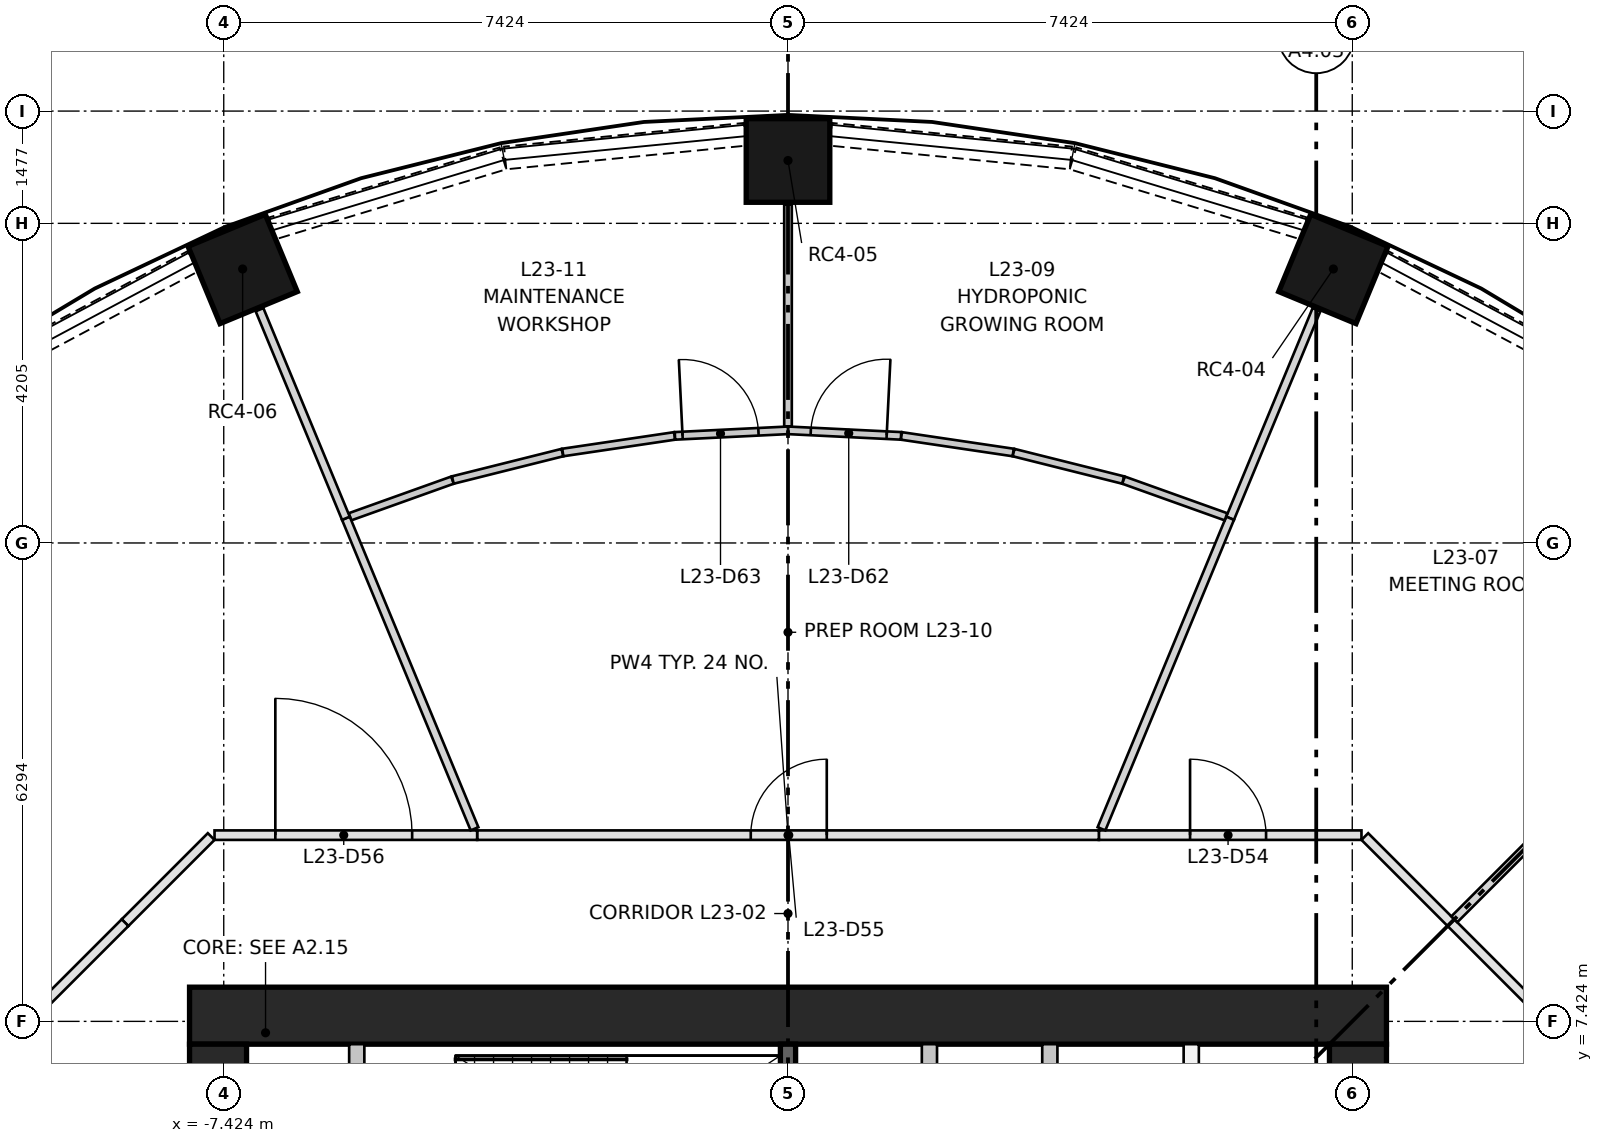
"""IFC4 building model, lengths in metres.
Left out: names, types, materials, properties, quantities, classifications, styles, units other than length and angle.
Written with IfcOpenShell. Run it as: python <this file> out.ifc"""

import sys

from ifc_helpers import new_model, si_unit, direction, frame, frame_2d, origin, origin_2d, place, context, subcontext, project, spatial, rectangle, extrude, element, fill, save


model = new_model("IFC4")
c1 = context("Model", 3, precision=1e-05, world=origin(), true_north=direction((0.0, 1.0)))
c2 = subcontext(c1, "Body", "Model", "MODEL_VIEW")
j1 = project(units=[si_unit("LENGTHUNIT", "METRE"), si_unit("PLANEANGLEUNIT", "RADIAN")], contexts=[c1])
p1 = place(None, origin())
s1 = spatial("IfcSite", under=j1, at=p1, CompositionType="ELEMENT")
p2 = place(p1, origin())
s2 = spatial("IfcBuilding", under=s1, at=p2, CompositionType="ELEMENT")
p3 = place(p2, frame((0.0, 0.0, 91.0)))
s3 = spatial("IfcBuildingStorey", under=s2, at=p3, CompositionType="ELEMENT", Elevation=91.0)
for number, where, z_axis, x_axis in (
    (1, (7.175, 17.323, 0.0), (0.0, 0.0, 1.0), (0.383, 0.924, 0.0)),
    (2, (0.0, 18.75, 0.0), (0.0, 0.0, 1.0), (0.0, 1.0, 0.0)),
    (3, (-7.175, 17.323, 0.0), (0.0, 0.0, 1.0), (-0.383, 0.924, 0.0)),
):
    element("IfcColumn", number, at=place(p3, frame(where, z_axis=z_axis, x_axis=x_axis)), inside=s3, PredefinedType="COLUMN", context=c2, shape_type="SweptSolid", body=[
        extrude(rectangle(XDim=1.1, YDim=1.1, at=origin_2d()), origin(), (0.0, 0.0, 1.0), 3.65),
    ])
p4 = place(p3, frame((-7.874, 7.499, 0.0), z_axis=(0.0, 0.0, 1.0), x_axis=(1.0, 0.0, 0.0)))
e4 = element("IfcWall", 4, at=p4, inside=s3, PredefinedType="SHEAR", context=c2, shape_type="SweptSolid", body=[
    extrude(rectangle(XDim=15.748, YDim=0.75, at=frame_2d((7.874, 0.0))), origin(), (0.0, 0.0, 1.0), 3.65),
])
p5 = place(p3, frame((-7.499, -7.124, 0.0), z_axis=(0.0, 0.0, 1.0), x_axis=(0.0, 1.0, 0.0)))
e5 = element("IfcWall", 5, at=p5, inside=s3, PredefinedType="SHEAR", context=c2, shape_type="SweptSolid", body=[
    extrude(rectangle(XDim=14.248, YDim=0.75, at=frame_2d((7.124, 0.0))), origin(), (0.0, 0.0, 1.0), 3.65),
])
p6 = place(p5, frame((6.624, 0.0, 0.0)))
e6 = element("IfcOpeningElement", 6, at=p6, cuts=e5, PredefinedType="OPENING", context=c2, shape_type="SweptSolid", body=[
    extrude(rectangle(XDim=1.0, YDim=2.1, at=frame_2d((0.5, 1.05))), frame((0.0, 0.385, 0.0), z_axis=(0.0, -1.0, 0.0), x_axis=(1.0, 0.0, 0.0)), (0.0, 0.0, 1.0), 0.77),
])
p7 = place(p5, frame((3.5, 0.0, 0.0)))
e7 = element("IfcOpeningElement", 7, at=p7, cuts=e5, PredefinedType="OPENING", context=c2, shape_type="SweptSolid", body=[
    extrude(rectangle(XDim=1.8, YDim=2.1, at=frame_2d((0.9, 1.05))), frame((0.0, 0.385, 0.0), z_axis=(0.0, -1.0, 0.0), x_axis=(1.0, 0.0, 0.0)), (0.0, 0.0, 1.0), 0.77),
])
p8 = place(p5, frame((8.948, 0.0, 0.0)))
e8 = element("IfcOpeningElement", 8, at=p8, cuts=e5, PredefinedType="OPENING", context=c2, shape_type="SweptSolid", body=[
    extrude(rectangle(XDim=1.8, YDim=2.1, at=frame_2d((0.9, 1.05))), frame((0.0, 0.385, 0.0), z_axis=(0.0, -1.0, 0.0), x_axis=(1.0, 0.0, 0.0)), (0.0, 0.0, 1.0), 0.77),
])
p9 = place(p5, frame((12.124, 0.0, 0.0)))
e9 = element("IfcOpeningElement", 9, at=p9, cuts=e5, PredefinedType="OPENING", context=c2, shape_type="SweptSolid", body=[
    extrude(rectangle(XDim=1.0, YDim=2.1, at=frame_2d((0.5, 1.05))), frame((0.0, 0.385, 0.0), z_axis=(0.0, -1.0, 0.0), x_axis=(1.0, 0.0, 0.0)), (0.0, 0.0, 1.0), 0.77),
])
p10 = place(p3, frame((7.499, -7.124, 0.0), z_axis=(0.0, 0.0, 1.0), x_axis=(0.0, 1.0, 0.0)))
e10 = element("IfcWall", 10, at=p10, inside=s3, PredefinedType="SHEAR", context=c2, shape_type="SweptSolid", body=[
    extrude(rectangle(XDim=14.248, YDim=0.75, at=frame_2d((7.124, 0.0))), origin(), (0.0, 0.0, 1.0), 3.65),
])
p11 = place(p10, frame((6.624, 0.0, 0.0)))
e11 = element("IfcOpeningElement", 11, at=p11, cuts=e10, PredefinedType="OPENING", context=c2, shape_type="SweptSolid", body=[
    extrude(rectangle(XDim=1.0, YDim=2.1, at=frame_2d((0.5, 1.05))), frame((0.0, 0.385, 0.0), z_axis=(0.0, -1.0, 0.0), x_axis=(1.0, 0.0, 0.0)), (0.0, 0.0, 1.0), 0.77),
])
p12 = place(p10, frame((3.5, 0.0, 0.0)))
e12 = element("IfcOpeningElement", 12, at=p12, cuts=e10, PredefinedType="OPENING", context=c2, shape_type="SweptSolid", body=[
    extrude(rectangle(XDim=1.8, YDim=2.1, at=frame_2d((0.9, 1.05))), frame((0.0, 0.385, 0.0), z_axis=(0.0, -1.0, 0.0), x_axis=(1.0, 0.0, 0.0)), (0.0, 0.0, 1.0), 0.77),
])
p13 = place(p10, frame((8.948, 0.0, 0.0)))
e13 = element("IfcOpeningElement", 13, at=p13, cuts=e10, PredefinedType="OPENING", context=c2, shape_type="SweptSolid", body=[
    extrude(rectangle(XDim=1.8, YDim=2.1, at=frame_2d((0.9, 1.05))), frame((0.0, 0.385, 0.0), z_axis=(0.0, -1.0, 0.0), x_axis=(1.0, 0.0, 0.0)), (0.0, 0.0, 1.0), 0.77),
])
p14 = place(p3, frame((0.0, 5.574, 0.0), z_axis=(0.0, 0.0, 1.0), x_axis=(0.0, 1.0, 0.0)))
e14 = element("IfcWall", 14, at=p14, inside=s3, PredefinedType="SHEAR", context=c2, shape_type="SweptSolid", body=[
    extrude(rectangle(XDim=1.55, YDim=0.2, at=frame_2d((0.775, 0.0))), origin(), (0.0, 0.0, 1.0), 3.3),
])
for number, where, z_axis, x_axis in (
    (15, (1.861, 4.174, 0.0), (0.0, 0.0, 1.0), (0.0, 1.0, 0.0)),
    (16, (3.445, 4.174, 0.0), (0.0, 0.0, 1.0), (0.0, 1.0, 0.0)),
    (17, (5.305, 4.174, 0.0), (0.0, 0.0, 1.0), (0.0, 1.0, 0.0)),
):
    element("IfcWall", number, at=place(p3, frame(where, z_axis=z_axis, x_axis=x_axis)), inside=s3, PredefinedType="PARTITIONING", context=c2, shape_type="SweptSolid", body=[
        extrude(rectangle(XDim=2.95, YDim=0.2, at=frame_2d((1.475, 0.0))), origin(), (0.0, 0.0, 1.0), 3.3),
    ])
p15 = place(p3, frame((-5.674, 4.174, 0.0), z_axis=(0.0, 0.0, 1.0), x_axis=(0.0, 1.0, 0.0)))
e18 = element("IfcWall", 18, at=p15, inside=s3, PredefinedType="PARTITIONING", context=c2, shape_type="SweptSolid", body=[
    extrude(rectangle(XDim=2.95, YDim=0.2, at=frame_2d((1.475, 0.0))), origin(), (0.0, 0.0, 1.0), 3.3),
])
p16 = place(p15, frame((0.125, 0.0, 0.0)))
e19 = element("IfcOpeningElement", 19, at=p16, cuts=e18, PredefinedType="OPENING", context=c2, shape_type="SweptSolid", body=[
    extrude(rectangle(XDim=0.95, YDim=2.1, at=frame_2d((0.475, 1.05))), frame((0.0, 0.11, 0.0), z_axis=(0.0, -1.0, 0.0), x_axis=(1.0, 0.0, 0.0)), (0.0, 0.0, 1.0), 0.22),
])
p17 = place(p15, frame((1.725, 0.0, 0.0)))
e20 = element("IfcOpeningElement", 20, at=p17, cuts=e18, PredefinedType="OPENING", context=c2, shape_type="SweptSolid", body=[
    extrude(rectangle(XDim=0.95, YDim=2.1, at=frame_2d((0.475, 1.05))), frame((0.0, 0.11, 0.0), z_axis=(0.0, -1.0, 0.0), x_axis=(1.0, 0.0, 0.0)), (0.0, 0.0, 1.0), 0.22),
])
p18 = place(p3, frame((10.626, 15.929, 0.0), z_axis=(0.0, 0.0, 1.0), x_axis=(-0.88188808669, 0.471458802606, 0.0)))
e21 = element("IfcWall", 21, at=p18, inside=s3, PredefinedType="SOLIDWALL", context=c2, shape_type="SweptSolid", body=[
    extrude(rectangle(XDim=3.172, YDim=0.3, at=frame_2d((1.586, 0.0))), origin(), (0.0, 0.0, 1.0), 0.9),
])
p19 = place(p3, frame((6.787, 17.856, 0.0), z_axis=(0.0, 0.0, 1.0), x_axis=(-0.956927923582, 0.290325591482, 0.0)))
e22 = element("IfcWall", 22, at=p19, inside=s3, PredefinedType="SOLIDWALL", context=c2, shape_type="SweptSolid", body=[
    extrude(rectangle(XDim=3.173, YDim=0.3, at=frame_2d((1.586, 0.0))), origin(), (0.0, 0.0, 1.0), 0.9),
])
for number, where, z_axis, x_axis in (
    (23, (3.721, 18.783, 0.0), (0.0, 0.0, 1.0), (-0.995, 0.098, 0.0)),
    (24, (-0.564, 19.094, 0.0), (0.0, 0.0, 1.0), (-0.995, -0.098, 0.0)),
):
    element("IfcWall", number, at=place(p3, frame(where, z_axis=z_axis, x_axis=x_axis)), inside=s3, PredefinedType="SOLIDWALL", context=c2, shape_type="SweptSolid", body=[
        extrude(rectangle(XDim=3.173, YDim=0.3, at=frame_2d((1.586, 0.0))), origin(), (0.0, 0.0, 1.0), 0.9),
    ])
p20 = place(p3, frame((-3.75, 18.778, 0.0), z_axis=(0.0, 0.0, 1.0), x_axis=(-0.956927923582, -0.290325591482, 0.0)))
e25 = element("IfcWall", 25, at=p20, inside=s3, PredefinedType="SOLIDWALL", context=c2, shape_type="SweptSolid", body=[
    extrude(rectangle(XDim=3.173, YDim=0.3, at=frame_2d((1.586, 0.0))), origin(), (0.0, 0.0, 1.0), 0.9),
])
p21 = place(p3, frame((-7.828, 17.425, 0.0), z_axis=(0.0, 0.0, 1.0), x_axis=(-0.88188808669, -0.471458802606, 0.0)))
e26 = element("IfcWall", 26, at=p21, inside=s3, PredefinedType="SOLIDWALL", context=c2, shape_type="SweptSolid", body=[
    extrude(rectangle(XDim=3.172, YDim=0.3, at=frame_2d((1.586, 0.0))), origin(), (0.0, 0.0, 1.0), 0.9),
])
p22 = place(p3, frame((8.722, 8.722, 0.0), z_axis=(0.0, 0.0, 1.0), x_axis=(0.70718294931, -0.707030604857, 0.0)))
e27 = element("IfcWall", 27, at=p22, inside=s3, PredefinedType="PARTITIONING", context=c2, shape_type="SweptSolid", body=[
    extrude(rectangle(XDim=1.603, YDim=0.125, at=frame_2d((0.801, 0.0))), origin(), (0.0, 0.0, 1.0), 3.3),
])
p23 = place(p3, frame((4.09, 9.874, 0.0), z_axis=(0.0, 0.0, 1.0), x_axis=(1.0, 0.0, 0.0)))
e28 = element("IfcWall", 28, at=p23, inside=s3, PredefinedType="PARTITIONING", context=c2, shape_type="SweptSolid", body=[
    extrude(rectangle(XDim=3.455, YDim=0.125, at=frame_2d((1.728, 0.0))), origin(), (0.0, 0.0, 1.0), 3.3),
])
p24 = place(p23, frame((1.2, 0.0, 0.0)))
e29 = element("IfcOpeningElement", 29, at=p24, cuts=e28, PredefinedType="OPENING", context=c2, shape_type="SweptSolid", body=[
    extrude(rectangle(XDim=1.0, YDim=2.1, at=frame_2d((0.5, 1.05))), frame((0.0, 0.073, 0.0), z_axis=(0.0, -1.0, 0.0), x_axis=(1.0, 0.0, 0.0)), (0.0, 0.0, 1.0), 0.145),
])
p25 = place(p3, frame((7.589, 9.856, 0.0), z_axis=(0.0, 0.0, 1.0), x_axis=(0.707030604857, -0.70718294931, 0.0)))
e30 = element("IfcWall", 30, at=p25, inside=s3, PredefinedType="PARTITIONING", context=c2, shape_type="SweptSolid", body=[
    extrude(rectangle(XDim=1.603, YDim=0.125, at=frame_2d((0.801, 0.0))), origin(), (0.0, 0.0, 1.0), 3.3),
])
p26 = place(p3, frame((-4.09, 9.874, 0.0), z_axis=(0.0, 0.0, 1.0), x_axis=(1.0, 0.0, 0.0)))
e31 = element("IfcWall", 31, at=p26, inside=s3, PredefinedType="PARTITIONING", context=c2, shape_type="SweptSolid", body=[
    extrude(rectangle(XDim=8.18, YDim=0.125, at=frame_2d((4.09, 0.0))), origin(), (0.0, 0.0, 1.0), 3.3),
])
p27 = place(p26, frame((3.6, 0.0, 0.0)))
e32 = element("IfcOpeningElement", 32, at=p27, cuts=e31, PredefinedType="OPENING", context=c2, shape_type="SweptSolid", body=[
    extrude(rectangle(XDim=1.0, YDim=2.1, at=frame_2d((0.5, 1.05))), frame((0.0, 0.073, 0.0), z_axis=(0.0, -1.0, 0.0), x_axis=(1.0, 0.0, 0.0)), (0.0, 0.0, 1.0), 0.145),
])
p28 = place(p3, frame((-8.722, 8.722, 0.0), z_axis=(0.0, 0.0, 1.0), x_axis=(0.707030604857, 0.70718294931, 0.0)))
e33 = element("IfcWall", 33, at=p28, inside=s3, PredefinedType="PARTITIONING", context=c2, shape_type="SweptSolid", body=[
    extrude(rectangle(XDim=1.603, YDim=0.125, at=frame_2d((0.801, 0.0))), origin(), (0.0, 0.0, 1.0), 3.3),
])
p29 = place(p3, frame((-7.545, 9.874, 0.0), z_axis=(0.0, 0.0, 1.0), x_axis=(1.0, 0.0, 0.0)))
e34 = element("IfcWall", 34, at=p29, inside=s3, PredefinedType="PARTITIONING", context=c2, shape_type="SweptSolid", body=[
    extrude(rectangle(XDim=3.455, YDim=0.125, at=frame_2d((1.728, 0.0))), origin(), (0.0, 0.0, 1.0), 3.3),
])
p30 = place(p29, frame((0.8, 0.0, 0.0)))
e35 = element("IfcOpeningElement", 35, at=p30, cuts=e34, PredefinedType="OPENING", context=c2, shape_type="SweptSolid", body=[
    extrude(rectangle(XDim=1.8, YDim=2.1, at=frame_2d((0.9, 1.05))), frame((0.0, 0.073, 0.0), z_axis=(0.0, -1.0, 0.0), x_axis=(1.0, 0.0, 0.0)), (0.0, 0.0, 1.0), 0.145),
])
p31 = place(p3, frame((-9.856, 7.589, 0.0), z_axis=(0.0, 0.0, 1.0), x_axis=(0.70718294931, 0.707030604857, 0.0)))
e36 = element("IfcWall", 36, at=p31, inside=s3, PredefinedType="PARTITIONING", context=c2, shape_type="SweptSolid", body=[
    extrude(rectangle(XDim=1.603, YDim=0.125, at=frame_2d((0.801, 0.0))), origin(), (0.0, 0.0, 1.0), 3.3),
])
p32 = place(p3, frame((12.848, 12.848, 0.0), z_axis=(0.0, 0.0, 1.0), x_axis=(-0.707106781187, -0.707106781187, 0.0)))
e37 = element("IfcWall", 37, at=p32, inside=s3, PredefinedType="PARTITIONING", context=c2, shape_type="SweptSolid", body=[
    extrude(rectangle(XDim=5.772, YDim=0.11, at=frame_2d((2.886, 0.0))), origin(), (0.0, 0.0, 1.0), 3.3),
])
p33 = place(p3, frame((5.817, 14.043, 0.0), z_axis=(0.0, 0.0, 1.0), x_axis=(0.382659139036, 0.923889594764, 0.0)))
e38 = element("IfcWall", 38, at=p33, inside=s3, PredefinedType="PARTITIONING", context=c2, shape_type="SweptSolid", body=[
    extrude(rectangle(XDim=2.97, YDim=0.11, at=frame_2d((1.485, 0.0))), origin(), (0.0, 0.0, 1.0), 3.3),
])
p34 = place(p3, frame((4.125, 9.958, 0.0), z_axis=(0.0, 0.0, 1.0), x_axis=(0.382709362011, 0.923868791674, 0.0)))
e39 = element("IfcWall", 39, at=p34, inside=s3, PredefinedType="PARTITIONING", context=c2, shape_type="SweptSolid", body=[
    extrude(rectangle(XDim=4.422, YDim=0.11, at=frame_2d((2.211, 0.0))), origin(), (0.0, 0.0, 1.0), 3.3),
])
p35 = place(p3, frame((0.0, 15.2, 0.0), z_axis=(0.0, 0.0, 1.0), x_axis=(0.998797711146, -0.049021752402, 0.0)))
e40 = element("IfcWall", 40, at=p35, inside=s3, PredefinedType="PARTITIONING", context=c2, shape_type="SweptSolid", body=[
    extrude(rectangle(XDim=1.489, YDim=0.1, at=frame_2d((0.745, 0.0))), origin(), (0.0, 0.0, 1.0), 3.3),
])
p36 = place(p35, frame((0.3, 0.0, 0.0)))
e41 = element("IfcOpeningElement", 41, at=p36, cuts=e40, PredefinedType="OPENING", context=c2, shape_type="SweptSolid", body=[
    extrude(rectangle(XDim=1.0, YDim=2.1, at=frame_2d((0.5, 1.05))), frame((0.0, 0.06, 0.0), z_axis=(0.0, -1.0, 0.0), x_axis=(1.0, 0.0, 0.0)), (0.0, 0.0, 1.0), 0.12),
])
p37 = place(p3, frame((2.963, 14.908, 0.0), z_axis=(0.0, 0.0, 1.0), x_axis=(-0.989166402168, 0.146798599525, 0.0)))
e42 = element("IfcWall", 42, at=p37, inside=s3, PredefinedType="PARTITIONING", context=c2, shape_type="SweptSolid", body=[
    extrude(rectangle(XDim=1.487, YDim=0.1, at=frame_2d((0.743, 0.0))), origin(), (0.0, 0.0, 1.0), 3.3),
])
p38 = place(p3, frame((4.41, 14.546, 0.0), z_axis=(0.0, 0.0, 1.0), x_axis=(-0.970055497102, 0.242883372306, 0.0)))
e43 = element("IfcWall", 43, at=p38, inside=s3, PredefinedType="PARTITIONING", context=c2, shape_type="SweptSolid", body=[
    extrude(rectangle(XDim=1.487, YDim=0.1, at=frame_2d((0.743, 0.0))), origin(), (0.0, 0.0, 1.0), 3.3),
])
p39 = place(p3, frame((5.763, 14.062, 0.0), z_axis=(0.0, 0.0, 1.0), x_axis=(-0.941587499657, 0.33676843749, 0.0)))
e44 = element("IfcWall", 44, at=p39, inside=s3, PredefinedType="PARTITIONING", context=c2, shape_type="SweptSolid", body=[
    extrude(rectangle(XDim=1.432, YDim=0.1, at=frame_2d((0.716, 0.0))), origin(), (0.0, 0.0, 1.0), 3.3),
])
p40 = place(p3, frame((0.0, 15.252, 0.0), z_axis=(0.0, 0.0, 1.0), x_axis=(0.0, 1.0, 0.0)))
e45 = element("IfcWall", 45, at=p40, inside=s3, PredefinedType="PARTITIONING", context=c2, shape_type="SweptSolid", body=[
    extrude(rectangle(XDim=2.917, YDim=0.1, at=frame_2d((1.459, 0.0))), origin(), (0.0, 0.0, 1.0), 3.3),
])
p41 = place(p3, frame((-5.763, 14.062, 0.0), z_axis=(0.0, 0.0, 1.0), x_axis=(0.941587499657, 0.33676843749, 0.0)))
e46 = element("IfcWall", 46, at=p41, inside=s3, PredefinedType="PARTITIONING", context=c2, shape_type="SweptSolid", body=[
    extrude(rectangle(XDim=1.432, YDim=0.1, at=frame_2d((0.716, 0.0))), origin(), (0.0, 0.0, 1.0), 3.3),
])
p42 = place(p3, frame((-4.41, 14.546, 0.0), z_axis=(0.0, 0.0, 1.0), x_axis=(0.970055497102, 0.242883372306, 0.0)))
e47 = element("IfcWall", 47, at=p42, inside=s3, PredefinedType="PARTITIONING", context=c2, shape_type="SweptSolid", body=[
    extrude(rectangle(XDim=1.487, YDim=0.1, at=frame_2d((0.743, 0.0))), origin(), (0.0, 0.0, 1.0), 3.3),
])
p43 = place(p3, frame((-2.963, 14.908, 0.0), z_axis=(0.0, 0.0, 1.0), x_axis=(0.989166402168, 0.146798599525, 0.0)))
e48 = element("IfcWall", 48, at=p43, inside=s3, PredefinedType="PARTITIONING", context=c2, shape_type="SweptSolid", body=[
    extrude(rectangle(XDim=1.487, YDim=0.1, at=frame_2d((0.743, 0.0))), origin(), (0.0, 0.0, 1.0), 3.3),
])
p44 = place(p3, frame((-1.487, 15.127, 0.0), z_axis=(0.0, 0.0, 1.0), x_axis=(0.998797711146, 0.049021752402, 0.0)))
e49 = element("IfcWall", 49, at=p44, inside=s3, PredefinedType="PARTITIONING", context=c2, shape_type="SweptSolid", body=[
    extrude(rectangle(XDim=1.489, YDim=0.1, at=frame_2d((0.745, 0.0))), origin(), (0.0, 0.0, 1.0), 3.3),
])
p45 = place(p44, frame((0.1, 0.0, 0.0)))
e50 = element("IfcOpeningElement", 50, at=p45, cuts=e49, PredefinedType="OPENING", context=c2, shape_type="SweptSolid", body=[
    extrude(rectangle(XDim=1.0, YDim=2.1, at=frame_2d((0.5, 1.05))), frame((0.0, 0.06, 0.0), z_axis=(0.0, -1.0, 0.0), x_axis=(1.0, 0.0, 0.0)), (0.0, 0.0, 1.0), 0.12),
])
p46 = place(p3, frame((-4.125, 9.958, 0.0), z_axis=(0.0, 0.0, 1.0), x_axis=(-0.382709362011, 0.923868791674, 0.0)))
e51 = element("IfcWall", 51, at=p46, inside=s3, PredefinedType="PARTITIONING", context=c2, shape_type="SweptSolid", body=[
    extrude(rectangle(XDim=4.422, YDim=0.11, at=frame_2d((2.211, 0.0))), origin(), (0.0, 0.0, 1.0), 3.3),
])
p47 = place(p3, frame((-5.817, 14.043, 0.0), z_axis=(0.0, 0.0, 1.0), x_axis=(-0.382659139036, 0.923889594764, 0.0)))
e52 = element("IfcWall", 52, at=p47, inside=s3, PredefinedType="PARTITIONING", context=c2, shape_type="SweptSolid", body=[
    extrude(rectangle(XDim=2.97, YDim=0.11, at=frame_2d((1.485, 0.0))), origin(), (0.0, 0.0, 1.0), 3.3),
])
p48 = place(p24, origin())
e53 = element("IfcDoor", 53, at=p48, inside=s3, OperationType="SINGLE_SWING_LEFT", PredefinedType="DOOR", context=c2, shape_type="SweptSolid", body=[
    extrude(rectangle(XDim=1.0, YDim=2.1, at=frame_2d((0.5, 1.05))), frame((0.0, 0.025, 0.0), z_axis=(0.0, -1.0, 0.0), x_axis=(1.0, 0.0, 0.0)), (0.0, 0.0, 1.0), 0.05),
])
fill(e29, e53)
p49 = place(p27, origin())
e54 = element("IfcDoor", 54, at=p49, inside=s3, OperationType="SINGLE_SWING_RIGHT", PredefinedType="DOOR", context=c2, shape_type="SweptSolid", body=[
    extrude(rectangle(XDim=1.0, YDim=2.1, at=frame_2d((0.5, 1.05))), frame((0.0, 0.025, 0.0), z_axis=(0.0, -1.0, 0.0), x_axis=(1.0, 0.0, 0.0)), (0.0, 0.0, 1.0), 0.05),
])
fill(e32, e54)
p50 = place(p30, origin())
e55 = element("IfcDoor", 55, at=p50, inside=s3, OperationType="DOUBLE_DOOR_SINGLE_SWING", PredefinedType="DOOR", context=c2, shape_type="SweptSolid", body=[
    extrude(rectangle(XDim=1.8, YDim=2.1, at=frame_2d((0.9, 1.05))), frame((0.0, 0.025, 0.0), z_axis=(0.0, -1.0, 0.0), x_axis=(1.0, 0.0, 0.0)), (0.0, 0.0, 1.0), 0.05),
])
fill(e35, e55)
p51 = place(p36, origin())
e56 = element("IfcDoor", 56, at=p51, inside=s3, OperationType="SINGLE_SWING_RIGHT", PredefinedType="DOOR", context=c2, shape_type="SweptSolid", body=[
    extrude(rectangle(XDim=1.0, YDim=2.1, at=frame_2d((0.5, 1.05))), frame((0.0, 0.025, 0.0), z_axis=(0.0, -1.0, 0.0), x_axis=(1.0, 0.0, 0.0)), (0.0, 0.0, 1.0), 0.05),
])
fill(e41, e56)
p52 = place(p45, origin())
e57 = element("IfcDoor", 57, at=p52, inside=s3, OperationType="SINGLE_SWING_LEFT", PredefinedType="DOOR", context=c2, shape_type="SweptSolid", body=[
    extrude(rectangle(XDim=1.0, YDim=2.1, at=frame_2d((0.5, 1.05))), frame((0.0, 0.025, 0.0), z_axis=(0.0, -1.0, 0.0), x_axis=(1.0, 0.0, 0.0)), (0.0, 0.0, 1.0), 0.05),
])
fill(e50, e57)
save(model, sys.argv[1])
